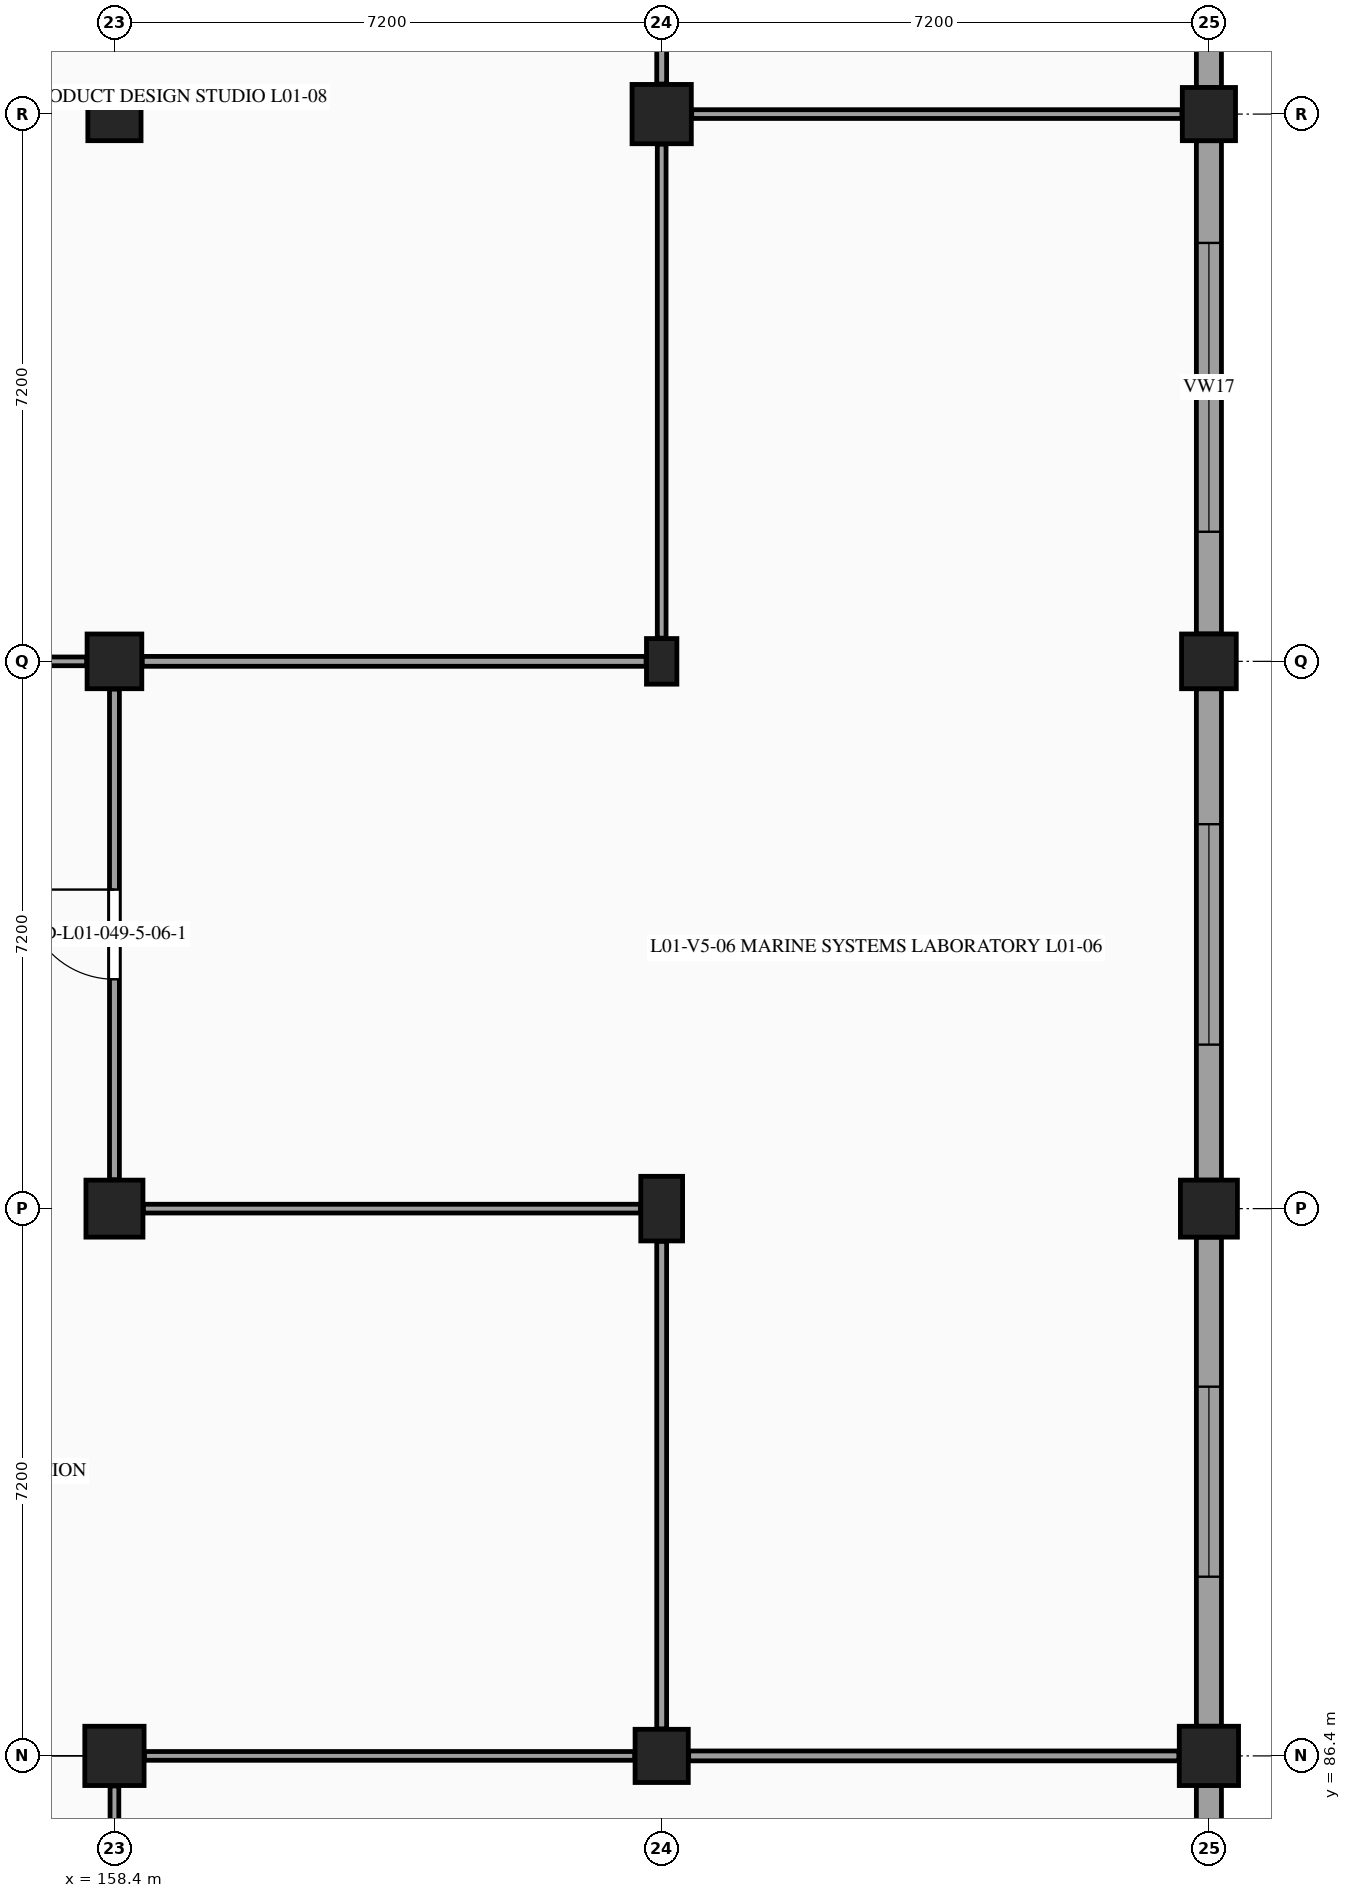
"""IFC4 building model, lengths in metres.
Left out: names, types, materials, properties, quantities, classifications, styles, units other than length and angle.
Written with IfcOpenShell. Run it as: python <this file> out.ifc"""

import sys

from ifc_helpers import new_model, si_unit, direction, frame, frame_2d, origin, origin_2d, place, context, subcontext, project, spatial, rectangle, extrude, element, fill, save


model = new_model("IFC4")
c1 = context("Model", 3, precision=1e-05, world=origin(), true_north=direction((0.0, 1.0)))
c2 = subcontext(c1, "Body", "Model", "MODEL_VIEW")
j1 = project(units=[si_unit("LENGTHUNIT", "METRE"), si_unit("PLANEANGLEUNIT", "RADIAN")], contexts=[c1])
p1 = place(None, origin())
s1 = spatial("IfcSite", under=j1, at=p1, CompositionType="ELEMENT")
p2 = place(p1, origin())
s2 = spatial("IfcBuilding", under=s1, at=p2, CompositionType="ELEMENT")
p3 = place(p2, frame((0.0, 0.0, 5.4)))
s3 = spatial("IfcBuildingStorey", under=s2, at=p3, CompositionType="ELEMENT", Elevation=5.4)
p4 = place(p3, frame((158.4, 86.4, 0.0), z_axis=(0.0, 0.0, 1.0), x_axis=(1.0, 0.0, 0.0)))
e1 = element("IfcColumn", 1, at=p4, inside=s3, PredefinedType="COLUMN", context=c2, shape_type="SweptSolid", body=[
    extrude(rectangle(XDim=0.78, YDim=0.78, at=origin_2d()), origin(), (0.0, 0.0, 1.0), 4.5),
])
p5 = place(p3, frame((158.4, 93.6, 0.0), z_axis=(0.0, 0.0, 1.0), x_axis=(1.0, 0.0, 0.0)))
e2 = element("IfcColumn", 2, at=p5, inside=s3, PredefinedType="COLUMN", context=c2, shape_type="SweptSolid", body=[
    extrude(rectangle(XDim=0.75, YDim=0.75, at=origin_2d()), origin(), (0.0, 0.0, 1.0), 4.5),
])
p6 = place(p3, frame((158.4, 100.8, 0.0), z_axis=(0.0, 0.0, 1.0), x_axis=(1.0, 0.0, 0.0)))
e3 = element("IfcColumn", 3, at=p6, inside=s3, PredefinedType="COLUMN", context=c2, shape_type="SweptSolid", body=[
    extrude(rectangle(XDim=0.72, YDim=0.72, at=origin_2d()), origin(), (0.0, 0.0, 1.0), 4.5),
])
for number, where, z_axis, x_axis in (
    (4, (158.4, 108.0, 0.0), (0.0, 0.0, 1.0), (1.0, 0.0, 0.0)),
    (5, (165.6, 86.4, 0.0), (0.0, 0.0, 1.0), (1.0, 0.0, 0.0)),
):
    element("IfcColumn", number, at=place(p3, frame(where, z_axis=z_axis, x_axis=x_axis)), inside=s3, PredefinedType="COLUMN", context=c2, shape_type="SweptSolid", body=[
        extrude(rectangle(XDim=0.7, YDim=0.7, at=origin_2d()), origin(), (0.0, 0.0, 1.0), 4.5),
    ])
p7 = place(p3, frame((165.6, 93.6, 0.0), z_axis=(0.0, 0.0, 1.0), x_axis=(1.0, 0.0, 0.0)))
e6 = element("IfcColumn", 6, at=p7, inside=s3, PredefinedType="COLUMN", context=c2, shape_type="SweptSolid", body=[
    extrude(rectangle(XDim=0.55, YDim=0.85, at=origin_2d()), origin(), (0.0, 0.0, 1.0), 4.5),
])
p8 = place(p3, frame((165.6, 100.8, 0.0), z_axis=(0.0, 0.0, 1.0), x_axis=(1.0, 0.0, 0.0)))
e7 = element("IfcColumn", 7, at=p8, inside=s3, PredefinedType="PILASTER", context=c2, shape_type="SweptSolid", body=[
    extrude(rectangle(XDim=0.4, YDim=0.6, at=origin_2d()), origin(), (0.0, 0.0, 1.0), 4.5),
])
for number, where, z_axis, x_axis in (
    (8, (165.6, 108.0, 0.0), (0.0, 0.0, 1.0), (1.0, 0.0, 0.0)),
    (9, (172.8, 86.4, 0.0), (0.0, 0.0, 1.0), (1.0, 0.0, 0.0)),
):
    element("IfcColumn", number, at=place(p3, frame(where, z_axis=z_axis, x_axis=x_axis)), inside=s3, PredefinedType="COLUMN", context=c2, shape_type="SweptSolid", body=[
        extrude(rectangle(XDim=0.78, YDim=0.78, at=origin_2d()), origin(), (0.0, 0.0, 1.0), 4.5),
    ])
p9 = place(p3, frame((172.8, 93.6, 0.0), z_axis=(0.0, 0.0, 1.0), x_axis=(1.0, 0.0, 0.0)))
e10 = element("IfcColumn", 10, at=p9, inside=s3, PredefinedType="COLUMN", context=c2, shape_type="SweptSolid", body=[
    extrude(rectangle(XDim=0.75, YDim=0.75, at=origin_2d()), origin(), (0.0, 0.0, 1.0), 4.5),
])
p10 = place(p3, frame((172.8, 100.8, 0.0), z_axis=(0.0, 0.0, 1.0), x_axis=(1.0, 0.0, 0.0)))
e11 = element("IfcColumn", 11, at=p10, inside=s3, PredefinedType="COLUMN", context=c2, shape_type="SweptSolid", body=[
    extrude(rectangle(XDim=0.72, YDim=0.72, at=origin_2d()), origin(), (0.0, 0.0, 1.0), 4.5),
])
p11 = place(p3, frame((172.8, 108.0, 0.0), z_axis=(0.0, 0.0, 1.0), x_axis=(1.0, 0.0, 0.0)))
e12 = element("IfcColumn", 12, at=p11, inside=s3, PredefinedType="COLUMN", context=c2, shape_type="SweptSolid", body=[
    extrude(rectangle(XDim=0.7, YDim=0.7, at=origin_2d()), origin(), (0.0, 0.0, 1.0), 4.5),
])
p12 = place(p3, frame((172.8, 114.775, 0.0), z_axis=(0.0, 0.0, 1.0), x_axis=(0.0, -1.0, 0.0)))
e13 = element("IfcWall", 13, at=p12, inside=s3, PredefinedType="STANDARD", context=c2, shape_type="SweptSolid", body=[
    extrude(rectangle(XDim=6.425, YDim=0.33, at=frame_2d((3.212, 0.0))), origin(), (0.0, 0.0, 1.0), 3.455),
])
p13 = place(p12, frame((1.012, 0.0, 0.98)))
e14 = element("IfcOpeningElement", 14, at=p13, cuts=e13, PredefinedType="OPENING", context=c2, shape_type="SweptSolid", body=[
    extrude(rectangle(XDim=4.4, YDim=1.65, at=frame_2d((2.2, 0.825))), frame((0.0, 0.175, 0.0), z_axis=(0.0, -1.0, 0.0), x_axis=(1.0, 0.0, 0.0)), (0.0, 0.0, 1.0), 0.35),
])
p14 = place(p3, frame((172.8, 107.65, 0.0), z_axis=(0.0, 0.0, 1.0), x_axis=(0.0, -1.0, 0.0)))
e15 = element("IfcWall", 15, at=p14, inside=s3, PredefinedType="STANDARD", context=c2, shape_type="SweptSolid", body=[
    extrude(rectangle(XDim=6.49, YDim=0.33, at=frame_2d((3.245, 0.0))), origin(), (0.0, 0.0, 1.0), 3.455),
])
p15 = place(p14, frame((1.345, 0.0, 0.98)))
e16 = element("IfcOpeningElement", 16, at=p15, cuts=e15, PredefinedType="OPENING", context=c2, shape_type="SweptSolid", body=[
    extrude(rectangle(XDim=3.8, YDim=1.6, at=frame_2d((1.9, 0.8))), frame((0.0, 0.175, 0.0), z_axis=(0.0, -1.0, 0.0), x_axis=(1.0, 0.0, 0.0)), (0.0, 0.0, 1.0), 0.35),
])
p16 = place(p3, frame((172.8, 100.44, 0.0), z_axis=(0.0, 0.0, 1.0), x_axis=(0.0, -1.0, 0.0)))
e17 = element("IfcWall", 17, at=p16, inside=s3, PredefinedType="STANDARD", context=c2, shape_type="SweptSolid", body=[
    extrude(rectangle(XDim=6.465, YDim=0.33, at=frame_2d((3.232, 0.0))), origin(), (0.0, 0.0, 1.0), 3.455),
])
p17 = place(p16, frame((1.782, 0.0, 0.98)))
e18 = element("IfcOpeningElement", 18, at=p17, cuts=e17, PredefinedType="OPENING", context=c2, shape_type="SweptSolid", body=[
    extrude(rectangle(XDim=2.9, YDim=1.6, at=frame_2d((1.45, 0.8))), frame((0.0, 0.175, 0.0), z_axis=(0.0, -1.0, 0.0), x_axis=(1.0, 0.0, 0.0)), (0.0, 0.0, 1.0), 0.35),
])
p18 = place(p3, frame((172.8, 93.225, 0.0), z_axis=(0.0, 0.0, 1.0), x_axis=(0.0, -1.0, 0.0)))
e19 = element("IfcWall", 19, at=p18, inside=s3, PredefinedType="STANDARD", context=c2, shape_type="SweptSolid", body=[
    extrude(rectangle(XDim=6.435, YDim=0.33, at=frame_2d((3.218, 0.0))), origin(), (0.0, 0.0, 1.0), 3.455),
])
p19 = place(p18, frame((1.968, 0.0, 0.98)))
e20 = element("IfcOpeningElement", 20, at=p19, cuts=e19, PredefinedType="OPENING", context=c2, shape_type="SweptSolid", body=[
    extrude(rectangle(XDim=2.5, YDim=1.35, at=frame_2d((1.25, 0.675))), frame((0.0, 0.175, 0.0), z_axis=(0.0, -1.0, 0.0), x_axis=(1.0, 0.0, 0.0)), (0.0, 0.0, 1.0), 0.35),
])
p20 = place(p3, frame((172.8, 86.01, 0.0), z_axis=(0.0, 0.0, 1.0), x_axis=(0.0, -1.0, 0.0)))
e21 = element("IfcWall", 21, at=p20, inside=s3, PredefinedType="STANDARD", context=c2, shape_type="SweptSolid", body=[
    extrude(rectangle(XDim=6.51, YDim=0.33, at=frame_2d((3.255, 0.0))), origin(), (0.0, 0.0, 1.0), 3.455),
])
p21 = place(p20, frame((2.205, 0.0, 0.98)))
e22 = element("IfcOpeningElement", 22, at=p21, cuts=e21, PredefinedType="OPENING", context=c2, shape_type="SweptSolid", body=[
    extrude(rectangle(XDim=2.1, YDim=1.3, at=frame_2d((1.05, 0.65))), frame((0.0, 0.175, 0.0), z_axis=(0.0, -1.0, 0.0), x_axis=(1.0, 0.0, 0.0)), (0.0, 0.0, 1.0), 0.35),
])
p22 = place(p3, frame((158.4, 79.505, 0.0), z_axis=(0.0, 0.0, 1.0), x_axis=(0.0, 1.0, 0.0)))
e23 = element("IfcWall", 23, at=p22, inside=s3, PredefinedType="PARTITIONING", context=c2, shape_type="SweptSolid", body=[
    extrude(rectangle(XDim=6.5, YDim=0.115, at=frame_2d((3.25, 0.0))), origin(), (0.0, 0.0, 1.0), 3.515),
])
p23 = place(p3, frame((158.4, 93.98, 0.0), z_axis=(0.0, 0.0, 1.0), x_axis=(0.0, 1.0, 0.0)))
e24 = element("IfcWall", 24, at=p23, inside=s3, PredefinedType="PARTITIONING", context=c2, shape_type="SweptSolid", body=[
    extrude(rectangle(XDim=6.455, YDim=0.13, at=frame_2d((3.228, 0.0))), origin(), (0.0, 0.0, 1.0), 3.575),
])
p24 = place(p23, frame((2.637, 0.0, 0.0)))
e25 = element("IfcOpeningElement", 25, at=p24, cuts=e24, PredefinedType="OPENING", context=c2, shape_type="SweptSolid", body=[
    extrude(rectangle(XDim=1.18, YDim=2.18, at=frame_2d((0.59, 1.09))), frame((0.0, 0.075, 0.0), z_axis=(0.0, -1.0, 0.0), x_axis=(1.0, 0.0, 0.0)), (0.0, 0.0, 1.0), 0.15),
])
p25 = place(p3, frame((151.405, 100.8, 0.0), z_axis=(0.0, 0.0, 1.0), x_axis=(1.0, 0.0, 0.0)))
e26 = element("IfcWall", 26, at=p25, inside=s3, PredefinedType="PARTITIONING", context=c2, shape_type="SweptSolid", body=[
    extrude(rectangle(XDim=6.63, YDim=0.115, at=frame_2d((3.315, 0.0))), origin(), (0.0, 0.0, 1.0), 3.47),
])
p26 = place(p3, frame((158.795, 86.4, 0.0), z_axis=(0.0, 0.0, 1.0), x_axis=(1.0, 0.0, 0.0)))
e27 = element("IfcWall", 27, at=p26, inside=s3, PredefinedType="PARTITIONING", context=c2, shape_type="SweptSolid", body=[
    extrude(rectangle(XDim=6.45, YDim=0.115, at=frame_2d((3.225, 0.0))), origin(), (0.0, 0.0, 1.0), 3.485),
])
p27 = place(p3, frame((165.6, 86.755, 0.0), z_axis=(0.0, 0.0, 1.0), x_axis=(0.0, 1.0, 0.0)))
e28 = element("IfcWall", 28, at=p27, inside=s3, PredefinedType="PARTITIONING", context=c2, shape_type="SweptSolid", body=[
    extrude(rectangle(XDim=6.415, YDim=0.13, at=frame_2d((3.208, 0.0))), origin(), (0.0, 0.0, 1.0), 3.58),
])
p28 = place(p3, frame((158.78, 93.6, 0.0), z_axis=(0.0, 0.0, 1.0), x_axis=(1.0, 0.0, 0.0)))
e29 = element("IfcWall", 29, at=p28, inside=s3, PredefinedType="PARTITIONING", context=c2, shape_type="SweptSolid", body=[
    extrude(rectangle(XDim=6.54, YDim=0.115, at=frame_2d((3.27, 0.0))), origin(), (0.0, 0.0, 1.0), 3.485),
])
p29 = place(p3, frame((158.765, 100.8, 0.0), z_axis=(0.0, 0.0, 1.0), x_axis=(1.0, 0.0, 0.0)))
e30 = element("IfcWall", 30, at=p29, inside=s3, PredefinedType="PARTITIONING", context=c2, shape_type="SweptSolid", body=[
    extrude(rectangle(XDim=6.63, YDim=0.13, at=frame_2d((3.315, 0.0))), origin(), (0.0, 0.0, 1.0), 3.485),
])
p30 = place(p3, frame((165.6, 101.105, 0.0), z_axis=(0.0, 0.0, 1.0), x_axis=(0.0, 1.0, 0.0)))
e31 = element("IfcWall", 31, at=p30, inside=s3, PredefinedType="PARTITIONING", context=c2, shape_type="SweptSolid", body=[
    extrude(rectangle(XDim=6.5, YDim=0.115, at=frame_2d((3.25, 0.0))), origin(), (0.0, 0.0, 1.0), 3.525),
])
p31 = place(p3, frame((165.6, 108.395, 0.0), z_axis=(0.0, 0.0, 1.0), x_axis=(0.0, 1.0, 0.0)))
e32 = element("IfcWall", 32, at=p31, inside=s3, PredefinedType="PARTITIONING", context=c2, shape_type="SweptSolid", body=[
    extrude(rectangle(XDim=6.425, YDim=0.13, at=frame_2d((3.212, 0.0))), origin(), (0.0, 0.0, 1.0), 3.525),
])
p32 = place(p3, frame((165.955, 86.4, 0.0), z_axis=(0.0, 0.0, 1.0), x_axis=(1.0, 0.0, 0.0)))
e33 = element("IfcWall", 33, at=p32, inside=s3, PredefinedType="PARTITIONING", context=c2, shape_type="SweptSolid", body=[
    extrude(rectangle(XDim=6.45, YDim=0.13, at=frame_2d((3.225, 0.0))), origin(), (0.0, 0.0, 1.0), 3.49),
])
p33 = place(p3, frame((165.995, 108.0, 0.0), z_axis=(0.0, 0.0, 1.0), x_axis=(1.0, 0.0, 0.0)))
e34 = element("IfcWall", 34, at=p33, inside=s3, PredefinedType="PARTITIONING", context=c2, shape_type="SweptSolid", body=[
    extrude(rectangle(XDim=6.45, YDim=0.115, at=frame_2d((3.225, 0.0))), origin(), (0.0, 0.0, 1.0), 3.49),
])
p34 = place(p15, origin())
e35 = element("IfcWindow", 35, at=p34, inside=s3, PartitioningType="SINGLE_PANEL", PredefinedType="WINDOW", context=c2, shape_type="SweptSolid", body=[
    extrude(rectangle(XDim=3.8, YDim=1.6, at=frame_2d((1.9, 0.8))), frame((0.0, -0.03, 0.0), z_axis=(0.0, -1.0, 0.0), x_axis=(1.0, 0.0, 0.0)), (0.0, 0.0, 1.0), 0.06),
])
fill(e16, e35)
p35 = place(p17, origin())
e36 = element("IfcWindow", 36, at=p35, inside=s3, PartitioningType="SINGLE_PANEL", PredefinedType="WINDOW", context=c2, shape_type="SweptSolid", body=[
    extrude(rectangle(XDim=2.9, YDim=1.6, at=frame_2d((1.45, 0.8))), frame((0.0, -0.03, 0.0), z_axis=(0.0, -1.0, 0.0), x_axis=(1.0, 0.0, 0.0)), (0.0, 0.0, 1.0), 0.06),
])
fill(e18, e36)
p36 = place(p19, origin())
e37 = element("IfcWindow", 37, at=p36, inside=s3, PartitioningType="SINGLE_PANEL", PredefinedType="WINDOW", context=c2, shape_type="SweptSolid", body=[
    extrude(rectangle(XDim=2.5, YDim=1.35, at=frame_2d((1.25, 0.675))), frame((0.0, -0.03, 0.0), z_axis=(0.0, -1.0, 0.0), x_axis=(1.0, 0.0, 0.0)), (0.0, 0.0, 1.0), 0.06),
])
fill(e20, e37)
p37 = place(p24, origin())
e38 = element("IfcDoor", 38, at=p37, inside=s3, OperationType="SINGLE_SWING_RIGHT", PredefinedType="DOOR", context=c2, shape_type="SweptSolid", body=[
    extrude(rectangle(XDim=1.18, YDim=2.18, at=frame_2d((0.59, 1.09))), frame((0.0, 0.025, 0.0), z_axis=(0.0, -1.0, 0.0), x_axis=(1.0, 0.0, 0.0)), (0.0, 0.0, 1.0), 0.05),
])
fill(e25, e38)
save(model, sys.argv[1])
